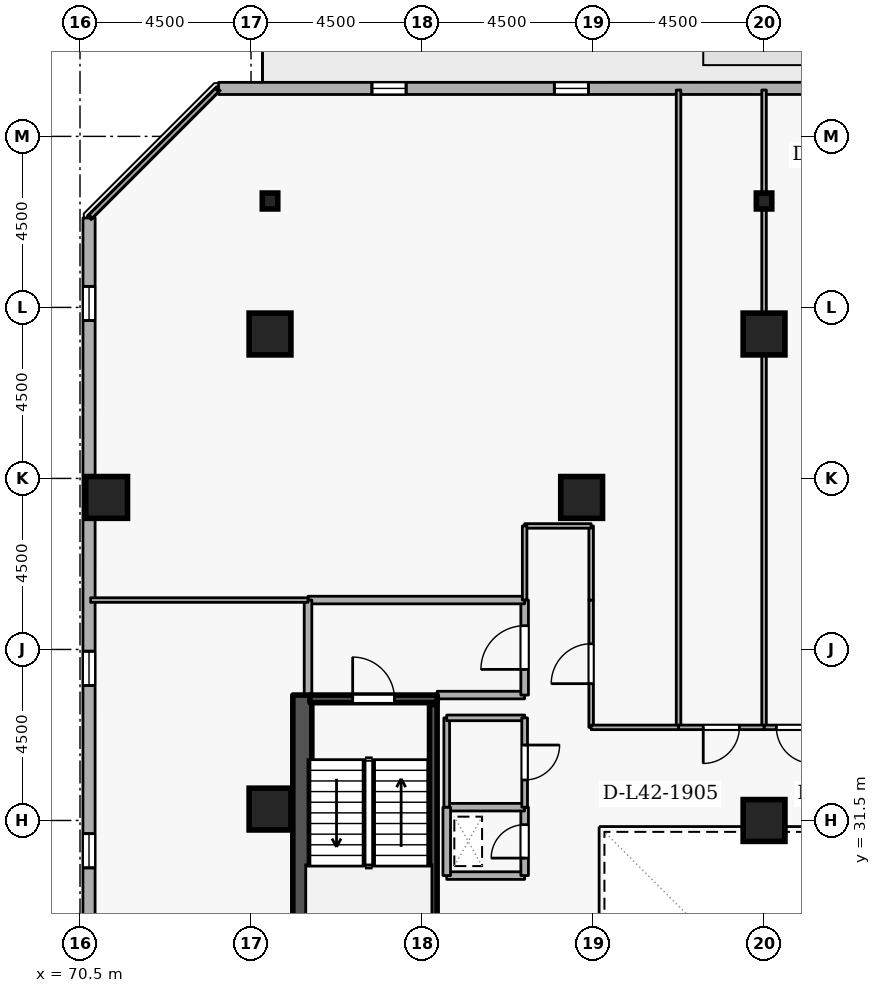
"""IFC4 building model, lengths in metres.
Left out: names, types, materials, properties, quantities, classifications, styles, units other than length and angle.
Written with IfcOpenShell. Run it as: python <this file> out.ifc"""

import sys

from ifc_helpers import new_model, si_unit, direction, frame, frame_2d, origin, origin_2d, place, context, subcontext, project, spatial, rectangle, i_section, extrude, element, fill, save


model = new_model("IFC4")
c1 = context("Model", 3, precision=1e-05, world=origin(), true_north=direction((0.0, 1.0)))
c2 = subcontext(c1, "Body", "Model", "MODEL_VIEW")
j1 = project(units=[si_unit("LENGTHUNIT", "METRE"), si_unit("PLANEANGLEUNIT", "RADIAN")], contexts=[c1])
p1 = place(None, origin())
s1 = spatial("IfcSite", under=j1, at=p1, CompositionType="ELEMENT")
p2 = place(p1, origin())
s2 = spatial("IfcBuilding", under=s1, at=p2, CompositionType="ELEMENT")
p3 = place(p2, frame((0.0, 0.0, 159.9)))
s3 = spatial("IfcBuildingStorey", under=s2, at=p3, CompositionType="ELEMENT", Elevation=159.9)
p4 = place(p3, frame((76.35, 19.2, 0.0), z_axis=(0.0, 0.0, 1.0), x_axis=(0.0, 1.0, 0.0)))
e1 = element("IfcWall", 1, at=p4, inside=s3, PredefinedType="SHEAR", context=c2, shape_type="SweptSolid", body=[
    extrude(rectangle(XDim=15.6, YDim=0.5, at=frame_2d((7.8, 0.0))), origin(), (0.0, 0.0, 1.0), 3.6),
])
for number, where, z_axis, x_axis in (
    (2, (88.5, 44.3, 0.0), (0.0, 0.0, 1.0), (1.0, 0.0, 0.0)),
    (3, (75.5, 44.3, 0.0), (0.0, 0.0, 1.0), (1.0, 0.0, 0.0)),
    (4, (71.2, 40.0, 0.0), (0.0, 0.0, 1.0), (1.0, 0.0, 0.0)),
    (5, (83.7, 40.0, 0.0), (0.0, 0.0, 1.0), (1.0, 0.0, 0.0)),
    (6, (75.5, 31.8, 0.0), (0.0, 0.0, 1.0), (1.0, 0.0, 0.0)),
    (7, (88.5, 31.5, 0.0), (0.0, 0.0, 1.0), (1.0, 0.0, 0.0)),
):
    element("IfcColumn", number, at=place(p3, frame(where, z_axis=z_axis, x_axis=x_axis)), inside=s3, PredefinedType="COLUMN", context=c2, shape_type="SweptSolid", body=[
        extrude(rectangle(XDim=1.1, YDim=1.1, at=origin_2d()), origin(), (0.0, 0.0, 1.0), 3.6),
    ])
for number, where, z_axis, x_axis in (
    (8, (88.5, 47.8, 0.0), (0.0, 0.0, 1.0), (1.0, 0.0, 0.0)),
    (9, (75.5, 47.8, 0.0), (0.0, 0.0, 1.0), (1.0, 0.0, 0.0)),
):
    element("IfcColumn", number, at=place(p3, frame(where, z_axis=z_axis, x_axis=x_axis)), inside=s3, PredefinedType="COLUMN", context=c2, shape_type="SweptSolid", body=[
        extrude(i_section(OverallWidth=0.407, OverallDepth=0.419, WebThickness=0.031, FlangeThickness=0.049, FilletRadius=0.015, at=origin_2d()), origin(), (0.0, 0.0, 1.0), 3.6),
    ])
p5 = place(p3, frame((109.681, 50.765, 0.0), z_axis=(0.0, 0.0, 1.0), x_axis=(-0.999999997144, -7.5574884e-05, 0.0)))
e10 = element("IfcWall", 10, at=p5, inside=s3, PredefinedType="STANDARD", context=c2, shape_type="SweptSolid", body=[
    extrude(rectangle(XDim=35.535, YDim=0.32, at=frame_2d((17.768, 0.0))), origin(), (0.0, 0.0, 1.0), 2.7),
])
p6 = place(p5, frame((18.218, 0.0, 0.0)))
e11 = element("IfcOpeningElement", 11, at=p6, cuts=e10, PredefinedType="OPENING", context=c2, shape_type="SweptSolid", body=[
    extrude(rectangle(XDim=1.0, YDim=2.08, at=frame_2d((0.5, 1.04))), frame((0.0, 0.17, 0.0), z_axis=(0.0, -1.0, 0.0), x_axis=(1.0, 0.0, 0.0)), (0.0, 0.0, 1.0), 0.34),
])
p7 = place(p5, frame((1.8, 0.0, 0.72)))
e12 = element("IfcOpeningElement", 12, at=p7, cuts=e10, PredefinedType="OPENING", context=c2, shape_type="SweptSolid", body=[
    extrude(rectangle(XDim=0.9, YDim=1.75, at=frame_2d((0.45, 0.875))), frame((0.0, 0.17, 0.0), z_axis=(0.0, -1.0, 0.0), x_axis=(1.0, 0.0, 0.0)), (0.0, 0.0, 1.0), 0.34),
])
p8 = place(p5, frame((6.6, 0.0, 0.72)))
e13 = element("IfcOpeningElement", 13, at=p8, cuts=e10, PredefinedType="OPENING", context=c2, shape_type="SweptSolid", body=[
    extrude(rectangle(XDim=0.9, YDim=1.75, at=frame_2d((0.45, 0.875))), frame((0.0, 0.17, 0.0), z_axis=(0.0, -1.0, 0.0), x_axis=(1.0, 0.0, 0.0)), (0.0, 0.0, 1.0), 0.34),
])
p9 = place(p5, frame((11.4, 0.0, 0.72)))
e14 = element("IfcOpeningElement", 14, at=p9, cuts=e10, PredefinedType="OPENING", context=c2, shape_type="SweptSolid", body=[
    extrude(rectangle(XDim=0.9, YDim=1.75, at=frame_2d((0.45, 0.875))), frame((0.0, 0.17, 0.0), z_axis=(0.0, -1.0, 0.0), x_axis=(1.0, 0.0, 0.0)), (0.0, 0.0, 1.0), 0.34),
])
p10 = place(p5, frame((16.2, 0.0, 0.72)))
e15 = element("IfcOpeningElement", 15, at=p10, cuts=e10, PredefinedType="OPENING", context=c2, shape_type="SweptSolid", body=[
    extrude(rectangle(XDim=0.9, YDim=1.75, at=frame_2d((0.45, 0.875))), frame((0.0, 0.17, 0.0), z_axis=(0.0, -1.0, 0.0), x_axis=(1.0, 0.0, 0.0)), (0.0, 0.0, 1.0), 0.34),
])
p11 = place(p5, frame((25.8, 0.0, 0.72)))
e16 = element("IfcOpeningElement", 16, at=p11, cuts=e10, PredefinedType="OPENING", context=c2, shape_type="SweptSolid", body=[
    extrude(rectangle(XDim=0.9, YDim=1.75, at=frame_2d((0.45, 0.875))), frame((0.0, 0.17, 0.0), z_axis=(0.0, -1.0, 0.0), x_axis=(1.0, 0.0, 0.0)), (0.0, 0.0, 1.0), 0.34),
])
p12 = place(p5, frame((30.6, 0.0, 0.72)))
e17 = element("IfcOpeningElement", 17, at=p12, cuts=e10, PredefinedType="OPENING", context=c2, shape_type="SweptSolid", body=[
    extrude(rectangle(XDim=0.9, YDim=1.75, at=frame_2d((0.45, 0.875))), frame((0.0, 0.17, 0.0), z_axis=(0.0, -1.0, 0.0), x_axis=(1.0, 0.0, 0.0)), (0.0, 0.0, 1.0), 0.34),
])
p13 = place(p3, frame((70.738, 47.354, 0.0), z_axis=(0.0, 0.0, 1.0), x_axis=(-7.5574884e-05, -0.999999997144, 0.0)))
e18 = element("IfcWall", 18, at=p13, inside=s3, PredefinedType="STANDARD", context=c2, shape_type="SweptSolid", body=[
    extrude(rectangle(XDim=35.535, YDim=0.32, at=frame_2d((17.768, 0.0))), origin(), (0.0, 0.0, 1.0), 2.7),
])
p14 = place(p13, frame((1.8, 0.0, 0.72)))
e19 = element("IfcOpeningElement", 19, at=p14, cuts=e18, PredefinedType="OPENING", context=c2, shape_type="SweptSolid", body=[
    extrude(rectangle(XDim=0.9, YDim=1.75, at=frame_2d((0.45, 0.875))), frame((0.0, 0.17, 0.0), z_axis=(0.0, -1.0, 0.0), x_axis=(1.0, 0.0, 0.0)), (0.0, 0.0, 1.0), 0.34),
])
p15 = place(p13, frame((11.4, 0.0, 0.72)))
e20 = element("IfcOpeningElement", 20, at=p15, cuts=e18, PredefinedType="OPENING", context=c2, shape_type="SweptSolid", body=[
    extrude(rectangle(XDim=0.9, YDim=1.75, at=frame_2d((0.45, 0.875))), frame((0.0, 0.17, 0.0), z_axis=(0.0, -1.0, 0.0), x_axis=(1.0, 0.0, 0.0)), (0.0, 0.0, 1.0), 0.34),
])
p16 = place(p13, frame((16.2, 0.0, 0.72)))
e21 = element("IfcOpeningElement", 21, at=p16, cuts=e18, PredefinedType="OPENING", context=c2, shape_type="SweptSolid", body=[
    extrude(rectangle(XDim=0.9, YDim=1.75, at=frame_2d((0.45, 0.875))), frame((0.0, 0.17, 0.0), z_axis=(0.0, -1.0, 0.0), x_axis=(1.0, 0.0, 0.0)), (0.0, 0.0, 1.0), 0.34),
])
p17 = place(p13, frame((25.8, 0.0, 0.72)))
e22 = element("IfcOpeningElement", 22, at=p17, cuts=e18, PredefinedType="OPENING", context=c2, shape_type="SweptSolid", body=[
    extrude(rectangle(XDim=0.9, YDim=1.75, at=frame_2d((0.45, 0.875))), frame((0.0, 0.17, 0.0), z_axis=(0.0, -1.0, 0.0), x_axis=(1.0, 0.0, 0.0)), (0.0, 0.0, 1.0), 0.34),
])
p18 = place(p13, frame((30.6, 0.0, 0.72)))
e23 = element("IfcOpeningElement", 23, at=p18, cuts=e18, PredefinedType="OPENING", context=c2, shape_type="SweptSolid", body=[
    extrude(rectangle(XDim=0.9, YDim=1.75, at=frame_2d((0.45, 0.875))), frame((0.0, 0.17, 0.0), z_axis=(0.0, -1.0, 0.0), x_axis=(1.0, 0.0, 0.0)), (0.0, 0.0, 1.0), 0.34),
])
p19 = place(p3, frame((76.55, 34.7, 0.0), z_axis=(0.0, 0.0, 1.0), x_axis=(1.0, 0.0, 0.0)))
e24 = element("IfcWall", 24, at=p19, inside=s3, PredefinedType="SHEAR", context=c2, shape_type="SweptSolid", body=[
    extrude(rectangle(XDim=3.35, YDim=0.2, at=frame_2d((1.675, 0.0))), origin(), (0.0, 0.0, 1.0), 3.6),
])
p20 = place(p19, frame((1.125, 0.0, 0.0)))
e25 = element("IfcOpeningElement", 25, at=p20, cuts=e24, PredefinedType="OPENING", context=c2, shape_type="SweptSolid", body=[
    extrude(rectangle(XDim=1.1, YDim=2.1, at=frame_2d((0.55, 1.05))), frame((0.0, 0.11, 0.0), z_axis=(0.0, -1.0, 0.0), x_axis=(1.0, 0.0, 0.0)), (0.0, 0.0, 1.0), 0.22),
])
p21 = place(p3, frame((79.797, 27.45, 0.0), z_axis=(0.0, 0.0, 1.0), x_axis=(0.0, 1.0, 0.0)))
e26 = element("IfcWall", 26, at=p21, inside=s3, PredefinedType="SHEAR", context=c2, shape_type="SweptSolid", body=[
    extrude(rectangle(XDim=7.1, YDim=0.2, at=frame_2d((3.55, 0.0))), origin(), (0.0, 0.0, 1.0), 3.6),
])
p22 = place(p3, frame((79.9, 34.8, 0.0), z_axis=(0.0, 0.0, 1.0), x_axis=(1.0, 0.0, 0.0)))
e27 = element("IfcWall", 27, at=p22, inside=s3, PredefinedType="STANDARD", context=c2, shape_type="SweptSolid", body=[
    extrude(rectangle(XDim=2.3, YDim=0.2, at=frame_2d((1.15, 0.0))), origin(), (0.0, 0.0, 1.0), 2.545),
])
p23 = place(p3, frame((82.2, 34.8, 0.0), z_axis=(0.0, 0.0, 1.0), x_axis=(0.0, 1.0, 0.0)))
e28 = element("IfcWall", 28, at=p23, inside=s3, PredefinedType="STANDARD", context=c2, shape_type="SweptSolid", body=[
    extrude(rectangle(XDim=2.5, YDim=0.2, at=frame_2d((1.25, 0.0))), origin(), (0.0, 0.0, 1.0), 3.34),
])
p24 = place(p23, frame((0.675, 0.0, 0.0)))
e29 = element("IfcOpeningElement", 29, at=p24, cuts=e28, PredefinedType="OPENING", context=c2, shape_type="SweptSolid", body=[
    extrude(rectangle(XDim=1.15, YDim=2.1, at=frame_2d((0.575, 1.05))), frame((0.0, 0.11, 0.0), z_axis=(0.0, -1.0, 0.0), x_axis=(1.0, 0.0, 0.0)), (0.0, 0.0, 1.0), 0.22),
])
p25 = place(p3, frame((82.2, 37.3, 0.0), z_axis=(0.0, 0.0, 1.0), x_axis=(-1.0, 0.0, 0.0)))
e30 = element("IfcWall", 30, at=p25, inside=s3, PredefinedType="STANDARD", context=c2, shape_type="SweptSolid", body=[
    extrude(rectangle(XDim=5.7, YDim=0.2, at=frame_2d((2.85, 0.0))), origin(), (0.0, 0.0, 1.0), 3.34),
])
p26 = place(p3, frame((76.5, 37.3, 0.0), z_axis=(0.0, 0.0, 1.0), x_axis=(0.0, -1.0, 0.0)))
e31 = element("IfcWall", 31, at=p26, inside=s3, PredefinedType="STANDARD", context=c2, shape_type="SweptSolid", body=[
    extrude(rectangle(XDim=2.5, YDim=0.2, at=frame_2d((1.25, 0.0))), origin(), (0.0, 0.0, 1.0), 3.34),
])
p27 = place(p3, frame((80.15, 30.05, 0.0), z_axis=(0.0, 0.0, 1.0), x_axis=(1.0, 0.0, 0.0)))
e32 = element("IfcWall", 32, at=p27, inside=s3, PredefinedType="STANDARD", context=c2, shape_type="SweptSolid", body=[
    extrude(rectangle(XDim=2.05, YDim=0.2, at=frame_2d((1.025, 0.0))), origin(), (0.0, 0.0, 1.0), 3.34),
])
p28 = place(p3, frame((82.2, 30.05, 0.0), z_axis=(0.0, 0.0, 1.0), x_axis=(0.0, 1.0, 0.0)))
e33 = element("IfcWall", 33, at=p28, inside=s3, PredefinedType="STANDARD", context=c2, shape_type="SweptSolid", body=[
    extrude(rectangle(XDim=1.8, YDim=0.2, at=frame_2d((0.9, 0.0))), origin(), (0.0, 0.0, 1.0), 3.34),
])
p29 = place(p28, frame((0.46, 0.0, 0.0)))
e34 = element("IfcOpeningElement", 34, at=p29, cuts=e33, PredefinedType="OPENING", context=c2, shape_type="SweptSolid", body=[
    extrude(rectangle(XDim=0.88, YDim=2.04, at=frame_2d((0.44, 1.02))), frame((0.0, 0.11, 0.0), z_axis=(0.0, -1.0, 0.0), x_axis=(1.0, 0.0, 0.0)), (0.0, 0.0, 1.0), 0.22),
])
p30 = place(p3, frame((82.2, 31.85, 0.0), z_axis=(0.0, 0.0, 1.0), x_axis=(-1.0, 0.0, 0.0)))
e35 = element("IfcWall", 35, at=p30, inside=s3, PredefinedType="STANDARD", context=c2, shape_type="SweptSolid", body=[
    extrude(rectangle(XDim=2.05, YDim=0.2, at=frame_2d((1.025, 0.0))), origin(), (0.0, 0.0, 1.0), 3.34),
])
p31 = place(p3, frame((80.15, 31.85, 0.0), z_axis=(0.0, 0.0, 1.0), x_axis=(0.0, -1.0, 0.0)))
e36 = element("IfcWall", 36, at=p31, inside=s3, PredefinedType="STANDARD", context=c2, shape_type="SweptSolid", body=[
    extrude(rectangle(XDim=1.8, YDim=0.2, at=frame_2d((0.9, 0.0))), origin(), (0.0, 0.0, 1.0), 3.34),
])
p32 = place(p3, frame((80.15, 31.85, 0.0), z_axis=(0.0, 0.0, 1.0), x_axis=(0.0, 1.0, 0.0)))
e37 = element("IfcWall", 37, at=p32, inside=s3, PredefinedType="PARTITIONING", context=c2, shape_type="SweptSolid", body=[
    extrude(rectangle(XDim=2.35, YDim=0.15, at=frame_2d((1.175, 0.0))), origin(), (0.0, 0.0, 1.0), 3.34),
])
p33 = place(p3, frame((80.15, 34.2, 0.0), z_axis=(0.0, 0.0, 1.0), x_axis=(1.0, 0.0, 0.0)))
e38 = element("IfcWall", 38, at=p33, inside=s3, PredefinedType="PARTITIONING", context=c2, shape_type="SweptSolid", body=[
    extrude(rectangle(XDim=2.05, YDim=0.15, at=frame_2d((1.025, 0.0))), origin(), (0.0, 0.0, 1.0), 2.545),
])
p34 = place(p3, frame((82.2, 34.2, 0.0), z_axis=(0.0, 0.0, 1.0), x_axis=(0.0, -1.0, 0.0)))
e39 = element("IfcWall", 39, at=p34, inside=s3, PredefinedType="PARTITIONING", context=c2, shape_type="SweptSolid", body=[
    extrude(rectangle(XDim=2.35, YDim=0.15, at=frame_2d((1.175, 0.0))), origin(), (0.0, 0.0, 1.0), 3.34),
])
p35 = place(p34, frame((0.715, 0.0, 0.0)))
e40 = element("IfcOpeningElement", 40, at=p35, cuts=e39, PredefinedType="OPENING", context=c2, shape_type="SweptSolid", body=[
    extrude(rectangle(XDim=0.92, YDim=2.08, at=frame_2d((0.46, 1.04))), frame((0.0, 0.085, 0.0), z_axis=(0.0, -1.0, 0.0), x_axis=(1.0, 0.0, 0.0)), (0.0, 0.0, 1.0), 0.17),
])
p36 = place(p3, frame((88.5, 33.95, 0.0), z_axis=(0.0, 0.0, 1.0), x_axis=(0.0, 1.0, 0.0)))
e41 = element("IfcWall", 41, at=p36, inside=s3, PredefinedType="PARTITIONING", context=c2, shape_type="SweptSolid", body=[
    extrude(rectangle(XDim=16.77, YDim=0.12, at=frame_2d((8.385, 0.0))), origin(), (0.0, 0.0, 1.0), 2.878),
])
p37 = place(p3, frame((90.1, 33.95, 0.0), z_axis=(0.0, 0.0, 1.0), x_axis=(-1.0, 0.0, 0.0)))
e42 = element("IfcWall", 42, at=p37, inside=s3, PredefinedType="PARTITIONING", context=c2, shape_type="SweptSolid", body=[
    extrude(rectangle(XDim=1.6, YDim=0.12, at=frame_2d((0.8, 0.0))), origin(), (0.0, 0.0, 1.0), 3.34),
])
p38 = place(p37, frame((0.325, 0.0, 0.0)))
e43 = element("IfcOpeningElement", 43, at=p38, cuts=e42, PredefinedType="OPENING", context=c2, shape_type="SweptSolid", body=[
    extrude(rectangle(XDim=0.95, YDim=2.1, at=frame_2d((0.475, 1.05))), frame((0.0, 0.07, 0.0), z_axis=(0.0, -1.0, 0.0), x_axis=(1.0, 0.0, 0.0)), (0.0, 0.0, 1.0), 0.14),
])
p39 = place(p3, frame((86.25, 33.95, 0.0), z_axis=(0.0, 0.0, 1.0), x_axis=(0.0, 1.0, 0.0)))
e44 = element("IfcWall", 44, at=p39, inside=s3, PredefinedType="PARTITIONING", context=c2, shape_type="SweptSolid", body=[
    extrude(rectangle(XDim=16.77, YDim=0.12, at=frame_2d((8.385, 0.0))), origin(), (0.0, 0.0, 1.0), 3.34),
])
p40 = place(p3, frame((88.5, 33.95, 0.0), z_axis=(0.0, 0.0, 1.0), x_axis=(-1.0, 0.0, 0.0)))
e45 = element("IfcWall", 45, at=p40, inside=s3, PredefinedType="PARTITIONING", context=c2, shape_type="SweptSolid", body=[
    extrude(rectangle(XDim=2.25, YDim=0.12, at=frame_2d((1.125, 0.0))), origin(), (0.0, 0.0, 1.0), 3.34),
])
p41 = place(p40, frame((0.65, 0.0, 0.0)))
e46 = element("IfcOpeningElement", 46, at=p41, cuts=e45, PredefinedType="OPENING", context=c2, shape_type="SweptSolid", body=[
    extrude(rectangle(XDim=0.95, YDim=2.1, at=frame_2d((0.475, 1.05))), frame((0.0, 0.07, 0.0), z_axis=(0.0, -1.0, 0.0), x_axis=(1.0, 0.0, 0.0)), (0.0, 0.0, 1.0), 0.14),
])
p42 = place(p3, frame((83.95, 33.95, 0.0), z_axis=(0.0, 0.0, 1.0), x_axis=(0.0, 1.0, 0.0)))
e47 = element("IfcWall", 47, at=p42, inside=s3, PredefinedType="PARTITIONING", context=c2, shape_type="SweptSolid", body=[
    extrude(rectangle(XDim=3.35, YDim=0.12, at=frame_2d((1.675, 0.0))), origin(), (0.0, 0.0, 1.0), 3.34),
])
p43 = place(p42, frame((1.15, 0.0, 0.0)))
e48 = element("IfcOpeningElement", 48, at=p43, cuts=e47, PredefinedType="OPENING", context=c2, shape_type="SweptSolid", body=[
    extrude(rectangle(XDim=1.05, YDim=2.1, at=frame_2d((0.525, 1.05))), frame((0.0, 0.07, 0.0), z_axis=(0.0, -1.0, 0.0), x_axis=(1.0, 0.0, 0.0)), (0.0, 0.0, 1.0), 0.14),
])
p44 = place(p3, frame((83.95, 37.3, 0.0), z_axis=(0.0, 0.0, 1.0), x_axis=(0.0, 1.0, 0.0)))
e49 = element("IfcWall", 49, at=p44, inside=s3, PredefinedType="PARTITIONING", context=c2, shape_type="SweptSolid", body=[
    extrude(rectangle(XDim=1.95, YDim=0.12, at=frame_2d((0.975, 0.0))), origin(), (0.0, 0.0, 1.0), 3.34),
])
p45 = place(p3, frame((83.95, 39.25, 0.0), z_axis=(0.0, 0.0, 1.0), x_axis=(-1.0, 0.0, 0.0)))
e50 = element("IfcWall", 50, at=p45, inside=s3, PredefinedType="PARTITIONING", context=c2, shape_type="SweptSolid", body=[
    extrude(rectangle(XDim=1.75, YDim=0.12, at=frame_2d((0.875, 0.0))), origin(), (0.0, 0.0, 1.0), 3.34),
])
p46 = place(p3, frame((82.2, 39.25, 0.0), z_axis=(0.0, 0.0, 1.0), x_axis=(0.0, -1.0, 0.0)))
e51 = element("IfcWall", 51, at=p46, inside=s3, PredefinedType="PARTITIONING", context=c2, shape_type="SweptSolid", body=[
    extrude(rectangle(XDim=1.95, YDim=0.12, at=frame_2d((0.975, 0.0))), origin(), (0.0, 0.0, 1.0), 3.34),
])
p47 = place(p3, frame((76.5, 37.3, 0.0), z_axis=(0.0, 0.0, 1.0), x_axis=(-1.0, 0.0, 0.0)))
e52 = element("IfcWall", 52, at=p47, inside=s3, PredefinedType="PARTITIONING", context=c2, shape_type="SweptSolid", body=[
    extrude(rectangle(XDim=5.72, YDim=0.12, at=frame_2d((2.86, 0.0))), origin(), (0.0, 0.0, 1.0), 3.34),
])
p48 = place(p3, frame((70.78, 47.394, 0.0), z_axis=(0.0, 0.0, 1.0), x_axis=(0.707106781187, 0.707106781187, 0.0)))
e53 = element("IfcWall", 53, at=p48, inside=s3, PredefinedType="PARTITIONING", context=c2, shape_type="SweptSolid", body=[
    extrude(rectangle(XDim=4.703, YDim=0.12, at=frame_2d((2.352, 0.0))), origin(), (0.0, 0.0, 1.0), 3.34),
])
p49 = place(p3, frame((86.25, 33.95, 0.0), z_axis=(0.0, 0.0, 1.0), x_axis=(-1.0, 0.0, 0.0)))
e54 = element("IfcWall", 54, at=p49, inside=s3, PredefinedType="PARTITIONING", context=c2, shape_type="SweptSolid", body=[
    extrude(rectangle(XDim=2.3, YDim=0.12, at=frame_2d((1.15, 0.0))), origin(), (0.0, 0.0, 1.0), 3.34),
])
p50 = place(p11, origin())
e55 = element("IfcWindow", 55, at=p50, inside=s3, PartitioningType="SINGLE_PANEL", PredefinedType="WINDOW", context=c2, shape_type="SweptSolid", body=[
    extrude(rectangle(XDim=0.9, YDim=1.75, at=frame_2d((0.45, 0.875))), frame((0.0, 0.03, 0.0), z_axis=(0.0, -1.0, 0.0), x_axis=(1.0, 0.0, 0.0)), (0.0, 0.0, 1.0), 0.06),
])
fill(e16, e55)
p51 = place(p12, origin())
e56 = element("IfcWindow", 56, at=p51, inside=s3, PartitioningType="SINGLE_PANEL", PredefinedType="WINDOW", context=c2, shape_type="SweptSolid", body=[
    extrude(rectangle(XDim=0.9, YDim=1.75, at=frame_2d((0.45, 0.875))), frame((0.0, 0.03, 0.0), z_axis=(0.0, -1.0, 0.0), x_axis=(1.0, 0.0, 0.0)), (0.0, 0.0, 1.0), 0.06),
])
fill(e17, e56)
p52 = place(p14, origin())
e57 = element("IfcWindow", 57, at=p52, inside=s3, PartitioningType="SINGLE_PANEL", PredefinedType="WINDOW", context=c2, shape_type="SweptSolid", body=[
    extrude(rectangle(XDim=0.9, YDim=1.75, at=frame_2d((0.45, 0.875))), frame((0.0, 0.03, 0.0), z_axis=(0.0, -1.0, 0.0), x_axis=(1.0, 0.0, 0.0)), (0.0, 0.0, 1.0), 0.06),
])
fill(e19, e57)
p53 = place(p15, origin())
e58 = element("IfcWindow", 58, at=p53, inside=s3, PartitioningType="SINGLE_PANEL", PredefinedType="WINDOW", context=c2, shape_type="SweptSolid", body=[
    extrude(rectangle(XDim=0.9, YDim=1.75, at=frame_2d((0.45, 0.875))), frame((0.0, 0.03, 0.0), z_axis=(0.0, -1.0, 0.0), x_axis=(1.0, 0.0, 0.0)), (0.0, 0.0, 1.0), 0.06),
])
fill(e20, e58)
p54 = place(p16, origin())
e59 = element("IfcWindow", 59, at=p54, inside=s3, PartitioningType="SINGLE_PANEL", PredefinedType="WINDOW", context=c2, shape_type="SweptSolid", body=[
    extrude(rectangle(XDim=0.9, YDim=1.75, at=frame_2d((0.45, 0.875))), frame((0.0, 0.03, 0.0), z_axis=(0.0, -1.0, 0.0), x_axis=(1.0, 0.0, 0.0)), (0.0, 0.0, 1.0), 0.06),
])
fill(e21, e59)
p55 = place(p20, origin())
e60 = element("IfcDoor", 60, at=p55, inside=s3, OperationType="SINGLE_SWING_LEFT", PredefinedType="DOOR", context=c2, shape_type="SweptSolid", body=[
    extrude(rectangle(XDim=1.1, YDim=2.1, at=frame_2d((0.55, 1.05))), frame((0.0, 0.025, 0.0), z_axis=(0.0, -1.0, 0.0), x_axis=(1.0, 0.0, 0.0)), (0.0, 0.0, 1.0), 0.05),
])
fill(e25, e60)
p56 = place(p24, origin())
e61 = element("IfcDoor", 61, at=p56, inside=s3, OperationType="SINGLE_SWING_LEFT", PredefinedType="DOOR", context=c2, shape_type="SweptSolid", body=[
    extrude(rectangle(XDim=1.15, YDim=2.1, at=frame_2d((0.575, 1.05))), frame((0.0, 0.025, 0.0), z_axis=(0.0, -1.0, 0.0), x_axis=(1.0, 0.0, 0.0)), (0.0, 0.0, 1.0), 0.05),
])
fill(e29, e61)
p57 = place(p29, origin())
e62 = element("IfcDoor", 62, at=p57, inside=s3, OperationType="SINGLE_SWING_LEFT", PredefinedType="DOOR", context=c2, shape_type="SweptSolid", body=[
    extrude(rectangle(XDim=0.88, YDim=2.04, at=frame_2d((0.44, 1.02))), frame((0.0, 0.025, 0.0), z_axis=(0.0, -1.0, 0.0), x_axis=(1.0, 0.0, 0.0)), (0.0, 0.0, 1.0), 0.05),
])
fill(e34, e62)
p58 = place(p35, origin())
e63 = element("IfcDoor", 63, at=p58, inside=s3, OperationType="SINGLE_SWING_LEFT", PredefinedType="DOOR", context=c2, shape_type="SweptSolid", body=[
    extrude(rectangle(XDim=0.92, YDim=2.08, at=frame_2d((0.46, 1.04))), frame((0.0, 0.025, 0.0), z_axis=(0.0, -1.0, 0.0), x_axis=(1.0, 0.0, 0.0)), (0.0, 0.0, 1.0), 0.05),
])
fill(e40, e63)
p59 = place(p38, origin())
e64 = element("IfcDoor", 64, at=p59, inside=s3, OperationType="SINGLE_SWING_LEFT", PredefinedType="DOOR", context=c2, shape_type="SweptSolid", body=[
    extrude(rectangle(XDim=0.95, YDim=2.1, at=frame_2d((0.475, 1.05))), frame((0.0, 0.025, 0.0), z_axis=(0.0, -1.0, 0.0), x_axis=(1.0, 0.0, 0.0)), (0.0, 0.0, 1.0), 0.05),
])
fill(e43, e64)
p60 = place(p41, origin())
e65 = element("IfcDoor", 65, at=p60, inside=s3, OperationType="SINGLE_SWING_RIGHT", PredefinedType="DOOR", context=c2, shape_type="SweptSolid", body=[
    extrude(rectangle(XDim=0.95, YDim=2.1, at=frame_2d((0.475, 1.05))), frame((0.0, 0.025, 0.0), z_axis=(0.0, -1.0, 0.0), x_axis=(1.0, 0.0, 0.0)), (0.0, 0.0, 1.0), 0.05),
])
fill(e46, e65)
p61 = place(p43, origin())
e66 = element("IfcDoor", 66, at=p61, inside=s3, OperationType="SINGLE_SWING_LEFT", PredefinedType="DOOR", context=c2, shape_type="SweptSolid", body=[
    extrude(rectangle(XDim=1.05, YDim=2.1, at=frame_2d((0.525, 1.05))), frame((0.0, 0.025, 0.0), z_axis=(0.0, -1.0, 0.0), x_axis=(1.0, 0.0, 0.0)), (0.0, 0.0, 1.0), 0.05),
])
fill(e48, e66)
save(model, sys.argv[1])
